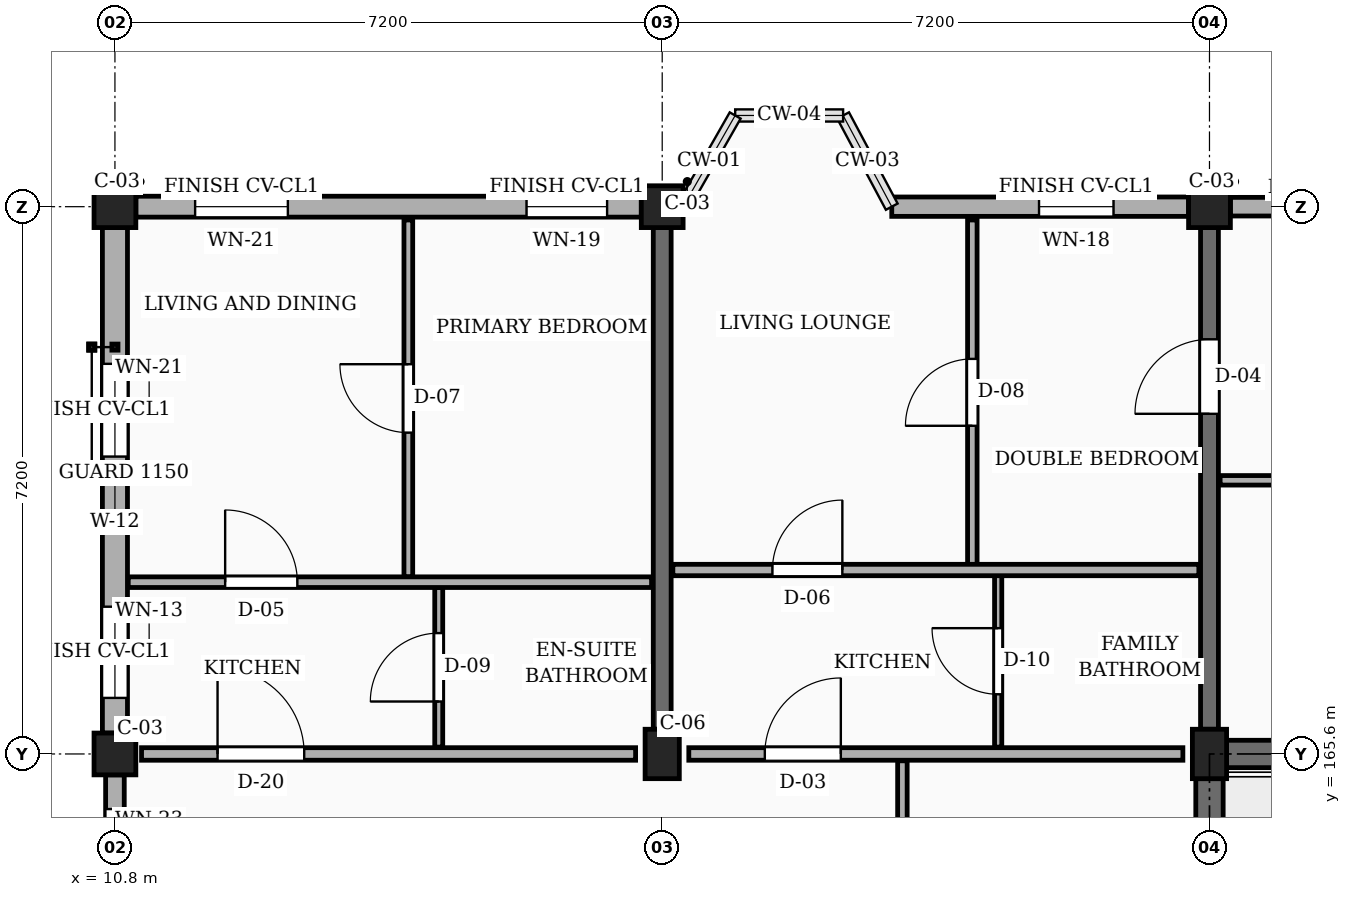
"""IFC4 building model, lengths in metres.
Left out: names, types, materials, properties, quantities, classifications, styles, units other than length and angle.
Written with IfcOpenShell. Run it as: python <this file> out.ifc"""

import sys

from ifc_helpers import new_model, si_unit, direction, frame, frame_2d, origin, origin_2d, place, context, subcontext, project, spatial, rectangle, extrude, element, fill, save


model = new_model("IFC4")
c1 = context("Model", 3, precision=1e-05, world=origin(), true_north=direction((0.0, 1.0)))
c2 = subcontext(c1, "Body", "Model", "MODEL_VIEW")
j1 = project(units=[si_unit("LENGTHUNIT", "METRE"), si_unit("PLANEANGLEUNIT", "RADIAN")], contexts=[c1])
p1 = place(None, origin())
s1 = spatial("IfcSite", under=j1, at=p1, CompositionType="ELEMENT")
p2 = place(p1, origin())
s2 = spatial("IfcBuilding", under=s1, at=p2, CompositionType="ELEMENT")
p3 = place(p2, frame((0.0, 0.0, 13.95)))
s3 = spatial("IfcBuildingStorey", under=s2, at=p3, CompositionType="ELEMENT", Elevation=13.95)
for number, where, z_axis, x_axis in (
    (1, (10.8, 165.6, 0.0), (0.0, 0.0, 1.0), (1.0, 0.0, 0.0)),
    (2, (10.8, 172.8, 0.0), (0.0, 0.0, 1.0), (1.0, 0.0, 0.0)),
):
    element("IfcColumn", number, at=place(p3, frame(where, z_axis=z_axis, x_axis=x_axis)), inside=s3, PredefinedType="COLUMN", context=c2, shape_type="SweptSolid", body=[
        extrude(rectangle(XDim=0.55, YDim=0.55, at=origin_2d()), origin(), (0.0, 0.0, 1.0), 3.15),
    ])
p4 = place(p3, frame((18.0, 165.6, 0.0), z_axis=(0.0, 0.0, 1.0), x_axis=(1.0, 0.0, 0.0)))
e3 = element("IfcColumn", 3, at=p4, inside=s3, PredefinedType="COLUMN", context=c2, shape_type="SweptSolid", body=[
    extrude(rectangle(XDim=0.45, YDim=0.65, at=origin_2d()), origin(), (0.0, 0.0, 1.0), 3.15),
])
p5 = place(p3, frame((18.0, 172.8, 0.0), z_axis=(0.0, 0.0, 1.0), x_axis=(1.0, 0.0, 0.0)))
e4 = element("IfcColumn", 4, at=p5, inside=s3, PredefinedType="COLUMN", context=c2, shape_type="SweptSolid", body=[
    extrude(rectangle(XDim=0.55, YDim=0.55, at=origin_2d()), origin(), (0.0, 0.0, 1.0), 3.15),
])
p6 = place(p3, frame((25.2, 165.6, 0.0), z_axis=(0.0, 0.0, 1.0), x_axis=(1.0, 0.0, 0.0)))
e5 = element("IfcColumn", 5, at=p6, inside=s3, PredefinedType="COLUMN", context=c2, shape_type="SweptSolid", body=[
    extrude(rectangle(XDim=0.45, YDim=0.65, at=origin_2d()), origin(), (0.0, 0.0, 1.0), 3.15),
])
p7 = place(p3, frame((25.2, 172.8, 0.0), z_axis=(0.0, 0.0, 1.0), x_axis=(1.0, 0.0, 0.0)))
e6 = element("IfcColumn", 6, at=p7, inside=s3, PredefinedType="COLUMN", context=c2, shape_type="SweptSolid", body=[
    extrude(rectangle(XDim=0.55, YDim=0.55, at=origin_2d()), origin(), (0.0, 0.0, 1.0), 3.15),
])
p8 = place(p3, frame((18.0, 165.925, 0.0), z_axis=(0.0, 0.0, 1.0), x_axis=(0.0, 1.0, 0.0)))
e7 = element("IfcWall", 7, at=p8, inside=s3, PredefinedType="SOLIDWALL", context=c2, shape_type="SweptSolid", body=[
    extrude(rectangle(XDim=6.6, YDim=0.235, at=frame_2d((3.3, 0.0))), origin(), (0.0, 0.0, 1.0), 2.185),
])
p9 = place(p3, frame((25.2, 165.925, 0.0), z_axis=(0.0, 0.0, 1.0), x_axis=(0.0, 1.0, 0.0)))
e8 = element("IfcWall", 8, at=p9, inside=s3, PredefinedType="SOLIDWALL", context=c2, shape_type="SweptSolid", body=[
    extrude(rectangle(XDim=6.6, YDim=0.235, at=frame_2d((3.3, 0.0))), origin(), (0.0, 0.0, 1.0), 2.185),
])
p10 = place(p9, frame((4.15, 0.0, 0.0)))
e9 = element("IfcOpeningElement", 9, at=p10, cuts=e8, PredefinedType="OPENING", context=c2, shape_type="SweptSolid", body=[
    extrude(rectangle(XDim=0.98, YDim=2.12, at=frame_2d((0.49, 1.06))), frame((0.0, 0.127, 0.0), z_axis=(0.0, -1.0, 0.0), x_axis=(1.0, 0.0, 0.0)), (0.0, 0.0, 1.0), 0.255),
])
p11 = place(p3, frame((32.125, 172.8, 0.0), z_axis=(0.0, 0.0, 1.0), x_axis=(-1.0, 0.0, 0.0)))
e10 = element("IfcWall", 10, at=p11, inside=s3, PredefinedType="SOLIDWALL", context=c2, shape_type="SweptSolid", body=[
    extrude(rectangle(XDim=6.65, YDim=0.245, at=frame_2d((3.325, 0.0))), origin(), (0.0, 0.0, 1.0), 2.455),
])
p12 = place(p11, frame((0.45, 0.0, 0.78)))
e11 = element("IfcOpeningElement", 11, at=p12, cuts=e10, PredefinedType="OPENING", context=c2, shape_type="SweptSolid", body=[
    extrude(rectangle(XDim=1.44, YDim=1.26, at=frame_2d((0.72, 0.63))), frame((0.0, 0.133, 0.0), z_axis=(0.0, -1.0, 0.0), x_axis=(1.0, 0.0, 0.0)), (0.0, 0.0, 1.0), 0.265),
])
p13 = place(p11, frame((4.65, 0.0, 0.78)))
e12 = element("IfcOpeningElement", 12, at=p13, cuts=e10, PredefinedType="OPENING", context=c2, shape_type="SweptSolid", body=[
    extrude(rectangle(XDim=0.98, YDim=1.36, at=frame_2d((0.49, 0.68))), frame((0.0, 0.133, 0.0), z_axis=(0.0, -1.0, 0.0), x_axis=(1.0, 0.0, 0.0)), (0.0, 0.0, 1.0), 0.265),
])
p14 = place(p3, frame((24.925, 172.8, 0.0), z_axis=(0.0, 0.0, 1.0), x_axis=(-1.0, 0.0, 0.0)))
e13 = element("IfcWall", 13, at=p14, inside=s3, PredefinedType="SOLIDWALL", context=c2, shape_type="SweptSolid", body=[
    extrude(rectangle(XDim=3.905, YDim=0.255, at=frame_2d((1.953, 0.0))), origin(), (0.0, 0.0, 1.0), 2.455),
])
p15 = place(p14, frame((0.988, 0.0, 0.78)))
e14 = element("IfcOpeningElement", 14, at=p15, cuts=e13, PredefinedType="OPENING", context=c2, shape_type="SweptSolid", body=[
    extrude(rectangle(XDim=0.98, YDim=1.36, at=frame_2d((0.49, 0.68))), frame((0.0, 0.137, 0.0), z_axis=(0.0, -1.0, 0.0), x_axis=(1.0, 0.0, 0.0)), (0.0, 0.0, 1.0), 0.275),
])
p16 = place(p3, frame((17.725, 172.8, 0.0), z_axis=(0.0, 0.0, 1.0), x_axis=(-1.0, 0.0, 0.0)))
e15 = element("IfcWall", 15, at=p16, inside=s3, PredefinedType="SOLIDWALL", context=c2, shape_type="SweptSolid", body=[
    extrude(rectangle(XDim=6.65, YDim=0.275, at=frame_2d((3.325, 0.0))), origin(), (0.0, 0.0, 1.0), 2.455),
])
p17 = place(p16, frame((0.45, 0.0, 0.78)))
e16 = element("IfcOpeningElement", 16, at=p17, cuts=e15, PredefinedType="OPENING", context=c2, shape_type="SweptSolid", body=[
    extrude(rectangle(XDim=1.06, YDim=1.36, at=frame_2d((0.53, 0.68))), frame((0.0, 0.147, 0.0), z_axis=(0.0, -1.0, 0.0), x_axis=(1.0, 0.0, 0.0)), (0.0, 0.0, 1.0), 0.295),
])
p18 = place(p16, frame((4.65, 0.0, 0.78)))
e17 = element("IfcOpeningElement", 17, at=p18, cuts=e15, PredefinedType="OPENING", context=c2, shape_type="SweptSolid", body=[
    extrude(rectangle(XDim=1.22, YDim=1.36, at=frame_2d((0.61, 0.68))), frame((0.0, 0.147, 0.0), z_axis=(0.0, -1.0, 0.0), x_axis=(1.0, 0.0, 0.0)), (0.0, 0.0, 1.0), 0.295),
])
p19 = place(p3, frame((10.8, 172.525, 0.0), z_axis=(0.0, 0.0, 1.0), x_axis=(0.0, -1.0, 0.0)))
e18 = element("IfcWall", 18, at=p19, inside=s3, PredefinedType="SOLIDWALL", context=c2, shape_type="SweptSolid", body=[
    extrude(rectangle(XDim=6.65, YDim=0.33, at=frame_2d((3.325, 0.0))), origin(), (0.0, 0.0, 1.0), 2.455),
])
p20 = place(p19, frame((1.792, 0.0, 0.78)))
e19 = element("IfcOpeningElement", 19, at=p20, cuts=e18, PredefinedType="OPENING", context=c2, shape_type="SweptSolid", body=[
    extrude(rectangle(XDim=1.22, YDim=1.36, at=frame_2d((0.61, 0.68))), frame((0.0, 0.175, 0.0), z_axis=(0.0, -1.0, 0.0), x_axis=(1.0, 0.0, 0.0)), (0.0, 0.0, 1.0), 0.35),
])
p21 = place(p19, frame((4.988, 0.0, 0.78)))
e20 = element("IfcOpeningElement", 20, at=p21, cuts=e18, PredefinedType="OPENING", context=c2, shape_type="SweptSolid", body=[
    extrude(rectangle(XDim=1.2, YDim=1.26, at=frame_2d((0.6, 0.63))), frame((0.0, 0.175, 0.0), z_axis=(0.0, -1.0, 0.0), x_axis=(1.0, 0.0, 0.0)), (0.0, 0.0, 1.0), 0.35),
])
p22 = place(p3, frame((10.8, 165.325, 0.0), z_axis=(0.0, 0.0, 1.0), x_axis=(0.0, -1.0, 0.0)))
e21 = element("IfcWall", 21, at=p22, inside=s3, PredefinedType="SOLIDWALL", context=c2, shape_type="SweptSolid", body=[
    extrude(rectangle(XDim=6.65, YDim=0.245, at=frame_2d((3.325, 0.0))), origin(), (0.0, 0.0, 1.0), 2.455),
])
p23 = place(p22, frame((0.45, 0.0, 0.78)))
e22 = element("IfcOpeningElement", 22, at=p23, cuts=e21, PredefinedType="OPENING", context=c2, shape_type="SweptSolid", body=[
    extrude(rectangle(XDim=1.38, YDim=1.36, at=frame_2d((0.69, 0.68))), frame((0.0, 0.133, 0.0), z_axis=(0.0, -1.0, 0.0), x_axis=(1.0, 0.0, 0.0)), (0.0, 0.0, 1.0), 0.265),
])
p24 = place(p22, frame((4.65, 0.0, 0.78)))
e23 = element("IfcOpeningElement", 23, at=p24, cuts=e21, PredefinedType="OPENING", context=c2, shape_type="SweptSolid", body=[
    extrude(rectangle(XDim=0.94, YDim=1.44, at=frame_2d((0.47, 0.72))), frame((0.0, 0.133, 0.0), z_axis=(0.0, -1.0, 0.0), x_axis=(1.0, 0.0, 0.0)), (0.0, 0.0, 1.0), 0.265),
])
p25 = place(p3, frame((25.2, 158.725, 0.0), z_axis=(0.0, 0.0, 1.0), x_axis=(0.0, 1.0, 0.0)))
e24 = element("IfcWall", 24, at=p25, inside=s3, PredefinedType="SHEAR", context=c2, shape_type="SweptSolid", body=[
    extrude(rectangle(XDim=6.55, YDim=0.36, at=frame_2d((3.275, 0.0))), origin(), (0.0, 0.0, 1.0), 2.885),
])
p26 = place(p3, frame((25.425, 165.6, 0.0), z_axis=(0.0, 0.0, 1.0), x_axis=(1.0, 0.0, 0.0)))
e25 = element("IfcWall", 25, at=p26, inside=s3, PredefinedType="SHEAR", context=c2, shape_type="SweptSolid", body=[
    extrude(rectangle(XDim=6.75, YDim=0.36, at=frame_2d((3.375, 0.0))), origin(), (0.0, 0.0, 1.0), 2.885),
])
p27 = place(p3, frame((11.15, 165.6, 0.0), z_axis=(0.0, 0.0, 1.0), x_axis=(1.0, 0.0, 0.0)))
e26 = element("IfcWall", 26, at=p27, inside=s3, PredefinedType="PARTITIONING", context=c2, shape_type="SweptSolid", body=[
    extrude(rectangle(XDim=6.5, YDim=0.165, at=frame_2d((3.25, 0.0))), origin(), (0.0, 0.0, 1.0), 2.235),
])
p28 = place(p27, frame((1.0, 0.0, 0.0)))
e27 = element("IfcOpeningElement", 27, at=p28, cuts=e26, PredefinedType="OPENING", context=c2, shape_type="SweptSolid", body=[
    extrude(rectangle(XDim=1.14, YDim=2.18, at=frame_2d((0.57, 1.09))), frame((0.0, 0.093, 0.0), z_axis=(0.0, -1.0, 0.0), x_axis=(1.0, 0.0, 0.0)), (0.0, 0.0, 1.0), 0.185),
])
p29 = place(p3, frame((18.35, 165.6, 0.0), z_axis=(0.0, 0.0, 1.0), x_axis=(1.0, 0.0, 0.0)))
e28 = element("IfcWall", 28, at=p29, inside=s3, PredefinedType="PARTITIONING", context=c2, shape_type="SweptSolid", body=[
    extrude(rectangle(XDim=6.5, YDim=0.165, at=frame_2d((3.25, 0.0))), origin(), (0.0, 0.0, 1.0), 2.235),
])
p30 = place(p29, frame((1.0, 0.0, 0.0)))
e29 = element("IfcOpeningElement", 29, at=p30, cuts=e28, PredefinedType="OPENING", context=c2, shape_type="SweptSolid", body=[
    extrude(rectangle(XDim=1.0, YDim=2.15, at=frame_2d((0.5, 1.075))), frame((0.0, 0.093, 0.0), z_axis=(0.0, -1.0, 0.0), x_axis=(1.0, 0.0, 0.0)), (0.0, 0.0, 1.0), 0.185),
])
p31 = place(p3, frame((14.66, 167.93, 0.0), z_axis=(0.0, 0.0, 1.0), x_axis=(0.0, 1.0, 0.0)))
e30 = element("IfcWall", 30, at=p31, inside=s3, PredefinedType="PARTITIONING", context=c2, shape_type="SweptSolid", body=[
    extrude(rectangle(XDim=4.695, YDim=0.115, at=frame_2d((2.348, 0.0))), origin(), (0.0, 0.0, 1.0), 2.32),
])
p32 = place(p31, frame((1.897, 0.0, 0.0)))
e31 = element("IfcOpeningElement", 31, at=p32, cuts=e30, PredefinedType="OPENING", context=c2, shape_type="SweptSolid", body=[
    extrude(rectangle(XDim=0.9, YDim=2.1, at=frame_2d((0.45, 1.05))), frame((0.0, 0.067, 0.0), z_axis=(0.0, -1.0, 0.0), x_axis=(1.0, 0.0, 0.0)), (0.0, 0.0, 1.0), 0.135),
])
p33 = place(p3, frame((15.06, 165.69, 0.0), z_axis=(0.0, 0.0, 1.0), x_axis=(0.0, 1.0, 0.0)))
e32 = element("IfcWall", 32, at=p33, inside=s3, PredefinedType="PARTITIONING", context=c2, shape_type="SweptSolid", body=[
    extrude(rectangle(XDim=2.1, YDim=0.105, at=frame_2d((1.05, 0.0))), origin(), (0.0, 0.0, 1.0), 2.32),
])
p34 = place(p33, frame((0.6, 0.0, 0.0)))
e33 = element("IfcOpeningElement", 33, at=p34, cuts=e32, PredefinedType="OPENING", context=c2, shape_type="SweptSolid", body=[
    extrude(rectangle(XDim=0.9, YDim=2.05, at=frame_2d((0.45, 1.025))), frame((0.0, 0.062, 0.0), z_axis=(0.0, -1.0, 0.0), x_axis=(1.0, 0.0, 0.0)), (0.0, 0.0, 1.0), 0.125),
])
p35 = place(p3, frame((10.975, 167.86, 0.0), z_axis=(0.0, 0.0, 1.0), x_axis=(1.0, 0.0, 0.0)))
e34 = element("IfcWall", 34, at=p35, inside=s3, PredefinedType="PARTITIONING", context=c2, shape_type="SweptSolid", body=[
    extrude(rectangle(XDim=6.885, YDim=0.14, at=frame_2d((3.442, 0.0))), origin(), (0.0, 0.0, 1.0), 2.32),
])
p36 = place(p35, frame((1.275, 0.0, 0.0)))
e35 = element("IfcOpeningElement", 35, at=p36, cuts=e34, PredefinedType="OPENING", context=c2, shape_type="SweptSolid", body=[
    extrude(rectangle(XDim=0.95, YDim=2.1, at=frame_2d((0.475, 1.05))), frame((0.0, 0.08, 0.0), z_axis=(0.0, -1.0, 0.0), x_axis=(1.0, 0.0, 0.0)), (0.0, 0.0, 1.0), 0.16),
])
p37 = place(p3, frame((21.16, 158.49, 0.0), z_axis=(0.0, 0.0, 1.0), x_axis=(0.0, 1.0, 0.0)))
e36 = element("IfcWall", 36, at=p37, inside=s3, PredefinedType="PARTITIONING", context=c2, shape_type="SweptSolid", body=[
    extrude(rectangle(XDim=7.02, YDim=0.125, at=frame_2d((3.51, 0.0))), origin(), (0.0, 0.0, 1.0), 2.32),
])
p38 = place(p37, frame((2.85, 0.0, 0.0)))
e37 = element("IfcOpeningElement", 37, at=p38, cuts=e36, PredefinedType="OPENING", context=c2, shape_type="SweptSolid", body=[
    extrude(rectangle(XDim=1.02, YDim=2.15, at=frame_2d((0.51, 1.075))), frame((0.0, 0.073, 0.0), z_axis=(0.0, -1.0, 0.0), x_axis=(1.0, 0.0, 0.0)), (0.0, 0.0, 1.0), 0.145),
])
p39 = place(p3, frame((22.08, 168.09, 0.0), z_axis=(0.0, 0.0, 1.0), x_axis=(0.0, 1.0, 0.0)))
e38 = element("IfcWall", 38, at=p39, inside=s3, PredefinedType="PARTITIONING", context=c2, shape_type="SweptSolid", body=[
    extrude(rectangle(XDim=4.535, YDim=0.125, at=frame_2d((2.268, 0.0))), origin(), (0.0, 0.0, 1.0), 2.32),
])
p40 = place(p39, frame((1.827, 0.0, 0.0)))
e39 = element("IfcOpeningElement", 39, at=p40, cuts=e38, PredefinedType="OPENING", context=c2, shape_type="SweptSolid", body=[
    extrude(rectangle(XDim=0.88, YDim=2.08, at=frame_2d((0.44, 1.04))), frame((0.0, 0.073, 0.0), z_axis=(0.0, -1.0, 0.0), x_axis=(1.0, 0.0, 0.0)), (0.0, 0.0, 1.0), 0.145),
])
p41 = place(p3, frame((22.42, 165.69, 0.0), z_axis=(0.0, 0.0, 1.0), x_axis=(0.0, 1.0, 0.0)))
e40 = element("IfcWall", 40, at=p41, inside=s3, PredefinedType="PARTITIONING", context=c2, shape_type="SweptSolid", body=[
    extrude(rectangle(XDim=2.26, YDim=0.095, at=frame_2d((1.13, 0.0))), origin(), (0.0, 0.0, 1.0), 2.32),
])
p42 = place(p41, frame((0.695, 0.0, 0.0)))
e41 = element("IfcOpeningElement", 41, at=p42, cuts=e40, PredefinedType="OPENING", context=c2, shape_type="SweptSolid", body=[
    extrude(rectangle(XDim=0.87, YDim=2.05, at=frame_2d((0.435, 1.025))), frame((0.0, 0.058, 0.0), z_axis=(0.0, -1.0, 0.0), x_axis=(1.0, 0.0, 0.0)), (0.0, 0.0, 1.0), 0.115),
])
p43 = place(p3, frame((18.14, 168.02, 0.0), z_axis=(0.0, 0.0, 1.0), x_axis=(1.0, 0.0, 0.0)))
e42 = element("IfcWall", 42, at=p43, inside=s3, PredefinedType="PARTITIONING", context=c2, shape_type="SweptSolid", body=[
    extrude(rectangle(XDim=6.92, YDim=0.15, at=frame_2d((3.46, 0.0))), origin(), (0.0, 0.0, 1.0), 2.32),
])
p44 = place(p43, frame((1.31, 0.0, 0.0)))
e43 = element("IfcOpeningElement", 43, at=p44, cuts=e42, PredefinedType="OPENING", context=c2, shape_type="SweptSolid", body=[
    extrude(rectangle(XDim=0.92, YDim=2.1, at=frame_2d((0.46, 1.05))), frame((0.0, 0.085, 0.0), z_axis=(0.0, -1.0, 0.0), x_axis=(1.0, 0.0, 0.0)), (0.0, 0.0, 1.0), 0.17),
])
p45 = place(p3, frame((25.34, 169.2, 0.0), z_axis=(0.0, 0.0, 1.0), x_axis=(1.0, 0.0, 0.0)))
e44 = element("IfcWall", 44, at=p45, inside=s3, PredefinedType="PARTITIONING", context=c2, shape_type="SweptSolid", body=[
    extrude(rectangle(XDim=6.92, YDim=0.125, at=frame_2d((3.46, 0.0))), origin(), (0.0, 0.0, 1.0), 2.32),
])
p46 = place(p45, frame((1.05, 0.0, 0.0)))
e45 = element("IfcOpeningElement", 45, at=p46, cuts=e44, PredefinedType="OPENING", context=c2, shape_type="SweptSolid", body=[
    extrude(rectangle(XDim=0.87, YDim=2.05, at=frame_2d((0.435, 1.025))), frame((0.0, 0.073, 0.0), z_axis=(0.0, -1.0, 0.0), x_axis=(1.0, 0.0, 0.0)), (0.0, 0.0, 1.0), 0.145),
])
p47 = place(p45, frame((4.45, 0.0, 0.0)))
e46 = element("IfcOpeningElement", 46, at=p47, cuts=e44, PredefinedType="OPENING", context=c2, shape_type="SweptSolid", body=[
    extrude(rectangle(XDim=0.88, YDim=2.08, at=frame_2d((0.44, 1.04))), frame((0.0, 0.073, 0.0), z_axis=(0.0, -1.0, 0.0), x_axis=(1.0, 0.0, 0.0)), (0.0, 0.0, 1.0), 0.145),
])
p48 = place(p15, origin())
e47 = element("IfcWindow", 47, at=p48, inside=s3, PartitioningType="SINGLE_PANEL", PredefinedType="WINDOW", context=c2, shape_type="SweptSolid", body=[
    extrude(rectangle(XDim=0.98, YDim=1.36, at=frame_2d((0.49, 0.68))), frame((0.0, 0.03, 0.0), z_axis=(0.0, -1.0, 0.0), x_axis=(1.0, 0.0, 0.0)), (0.0, 0.0, 1.0), 0.06),
])
fill(e14, e47)
p49 = place(p17, origin())
e48 = element("IfcWindow", 48, at=p49, inside=s3, PartitioningType="SINGLE_PANEL", PredefinedType="WINDOW", context=c2, shape_type="SweptSolid", body=[
    extrude(rectangle(XDim=1.06, YDim=1.36, at=frame_2d((0.53, 0.68))), frame((0.0, 0.03, 0.0), z_axis=(0.0, -1.0, 0.0), x_axis=(1.0, 0.0, 0.0)), (0.0, 0.0, 1.0), 0.06),
])
fill(e16, e48)
p50 = place(p18, origin())
e49 = element("IfcWindow", 49, at=p50, inside=s3, PartitioningType="SINGLE_PANEL", PredefinedType="WINDOW", context=c2, shape_type="SweptSolid", body=[
    extrude(rectangle(XDim=1.22, YDim=1.36, at=frame_2d((0.61, 0.68))), frame((0.0, 0.03, 0.0), z_axis=(0.0, -1.0, 0.0), x_axis=(1.0, 0.0, 0.0)), (0.0, 0.0, 1.0), 0.06),
])
fill(e17, e49)
p51 = place(p20, origin())
e50 = element("IfcWindow", 50, at=p51, inside=s3, PartitioningType="SINGLE_PANEL", PredefinedType="WINDOW", context=c2, shape_type="SweptSolid", body=[
    extrude(rectangle(XDim=1.22, YDim=1.36, at=frame_2d((0.61, 0.68))), frame((0.0, 0.03, 0.0), z_axis=(0.0, -1.0, 0.0), x_axis=(1.0, 0.0, 0.0)), (0.0, 0.0, 1.0), 0.06),
])
fill(e19, e50)
p52 = place(p21, origin())
e51 = element("IfcWindow", 51, at=p52, inside=s3, PartitioningType="SINGLE_PANEL", PredefinedType="WINDOW", context=c2, shape_type="SweptSolid", body=[
    extrude(rectangle(XDim=1.2, YDim=1.26, at=frame_2d((0.6, 0.63))), frame((0.0, 0.03, 0.0), z_axis=(0.0, -1.0, 0.0), x_axis=(1.0, 0.0, 0.0)), (0.0, 0.0, 1.0), 0.06),
])
fill(e20, e51)
p53 = place(p23, origin())
e52 = element("IfcWindow", 52, at=p53, inside=s3, PartitioningType="SINGLE_PANEL", PredefinedType="WINDOW", context=c2, shape_type="SweptSolid", body=[
    extrude(rectangle(XDim=1.38, YDim=1.36, at=frame_2d((0.69, 0.68))), frame((0.0, 0.03, 0.0), z_axis=(0.0, -1.0, 0.0), x_axis=(1.0, 0.0, 0.0)), (0.0, 0.0, 1.0), 0.06),
])
fill(e22, e52)
p54 = place(p28, origin())
e53 = element("IfcDoor", 53, at=p54, inside=s3, OperationType="SINGLE_SWING_LEFT", PredefinedType="DOOR", context=c2, shape_type="SweptSolid", body=[
    extrude(rectangle(XDim=1.14, YDim=2.18, at=frame_2d((0.57, 1.09))), frame((0.0, 0.025, 0.0), z_axis=(0.0, -1.0, 0.0), x_axis=(1.0, 0.0, 0.0)), (0.0, 0.0, 1.0), 0.05),
])
fill(e27, e53)
p55 = place(p30, origin())
e54 = element("IfcDoor", 54, at=p55, inside=s3, OperationType="SINGLE_SWING_RIGHT", PredefinedType="DOOR", context=c2, shape_type="SweptSolid", body=[
    extrude(rectangle(XDim=1.0, YDim=2.15, at=frame_2d((0.5, 1.075))), frame((0.0, 0.025, 0.0), z_axis=(0.0, -1.0, 0.0), x_axis=(1.0, 0.0, 0.0)), (0.0, 0.0, 1.0), 0.05),
])
fill(e29, e54)
p56 = place(p32, origin())
e55 = element("IfcDoor", 55, at=p56, inside=s3, OperationType="SINGLE_SWING_RIGHT", PredefinedType="DOOR", context=c2, shape_type="SweptSolid", body=[
    extrude(rectangle(XDim=0.9, YDim=2.1, at=frame_2d((0.45, 1.05))), frame((0.0, 0.025, 0.0), z_axis=(0.0, -1.0, 0.0), x_axis=(1.0, 0.0, 0.0)), (0.0, 0.0, 1.0), 0.05),
])
fill(e31, e55)
p57 = place(p34, origin())
e56 = element("IfcDoor", 56, at=p57, inside=s3, OperationType="SINGLE_SWING_LEFT", PredefinedType="DOOR", context=c2, shape_type="SweptSolid", body=[
    extrude(rectangle(XDim=0.9, YDim=2.05, at=frame_2d((0.45, 1.025))), frame((0.0, 0.025, 0.0), z_axis=(0.0, -1.0, 0.0), x_axis=(1.0, 0.0, 0.0)), (0.0, 0.0, 1.0), 0.05),
])
fill(e33, e56)
p58 = place(p36, origin())
e57 = element("IfcDoor", 57, at=p58, inside=s3, OperationType="SINGLE_SWING_LEFT", PredefinedType="DOOR", context=c2, shape_type="SweptSolid", body=[
    extrude(rectangle(XDim=0.95, YDim=2.1, at=frame_2d((0.475, 1.05))), frame((0.0, 0.025, 0.0), z_axis=(0.0, -1.0, 0.0), x_axis=(1.0, 0.0, 0.0)), (0.0, 0.0, 1.0), 0.05),
])
fill(e35, e57)
p59 = place(p40, origin())
e58 = element("IfcDoor", 58, at=p59, inside=s3, OperationType="SINGLE_SWING_LEFT", PredefinedType="DOOR", context=c2, shape_type="SweptSolid", body=[
    extrude(rectangle(XDim=0.88, YDim=2.08, at=frame_2d((0.44, 1.04))), frame((0.0, 0.025, 0.0), z_axis=(0.0, -1.0, 0.0), x_axis=(1.0, 0.0, 0.0)), (0.0, 0.0, 1.0), 0.05),
])
fill(e39, e58)
p60 = place(p42, origin())
e59 = element("IfcDoor", 59, at=p60, inside=s3, OperationType="SINGLE_SWING_RIGHT", PredefinedType="DOOR", context=c2, shape_type="SweptSolid", body=[
    extrude(rectangle(XDim=0.87, YDim=2.05, at=frame_2d((0.435, 1.025))), frame((0.0, 0.025, 0.0), z_axis=(0.0, -1.0, 0.0), x_axis=(1.0, 0.0, 0.0)), (0.0, 0.0, 1.0), 0.05),
])
fill(e41, e59)
p61 = place(p44, origin())
e60 = element("IfcDoor", 60, at=p61, inside=s3, OperationType="SINGLE_SWING_RIGHT", PredefinedType="DOOR", context=c2, shape_type="SweptSolid", body=[
    extrude(rectangle(XDim=0.92, YDim=2.1, at=frame_2d((0.46, 1.05))), frame((0.0, 0.025, 0.0), z_axis=(0.0, -1.0, 0.0), x_axis=(1.0, 0.0, 0.0)), (0.0, 0.0, 1.0), 0.05),
])
fill(e43, e60)
p62 = place(p10, origin())
e61 = element("IfcDoor", 61, at=p62, inside=s3, OperationType="SINGLE_SWING_LEFT", PredefinedType="DOOR", context=c2, shape_type="SweptSolid", body=[
    extrude(rectangle(XDim=0.98, YDim=2.12, at=frame_2d((0.49, 1.06))), frame((0.0, 0.025, 0.0), z_axis=(0.0, -1.0, 0.0), x_axis=(1.0, 0.0, 0.0)), (0.0, 0.0, 1.0), 0.05),
])
fill(e9, e61)
save(model, sys.argv[1])
